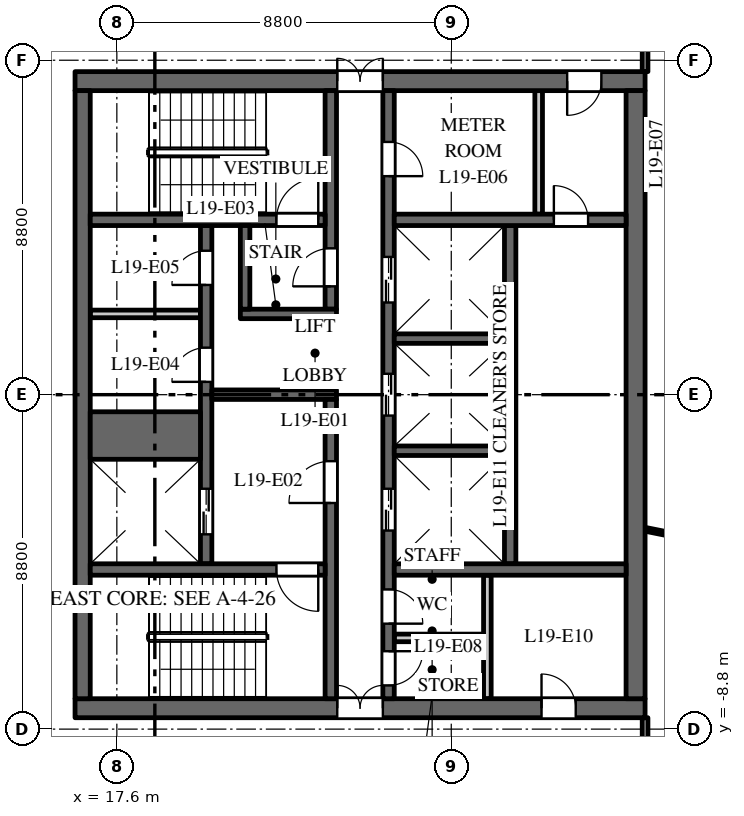
"""IFC4 building model, lengths in metres.
Left out: names, types, materials, properties, quantities, classifications, styles, units other than length and angle.
Written with IfcOpenShell. Run it as: python <this file> out.ifc"""

import sys

from ifc_helpers import new_model, si_unit, direction, frame, frame_2d, origin, place, context, subcontext, project, spatial, rectangle, extrude, element, fill, save


model = new_model("IFC4")
c1 = context("Model", 3, precision=1e-05, world=origin(), true_north=direction((0.0, 1.0)))
c2 = subcontext(c1, "Body", "Model", "MODEL_VIEW")
j1 = project(units=[si_unit("LENGTHUNIT", "METRE"), si_unit("PLANEANGLEUNIT", "RADIAN")], contexts=[c1])
p1 = place(None, origin())
s1 = spatial("IfcSite", under=j1, at=p1, CompositionType="ELEMENT")
p2 = place(p1, origin())
s2 = spatial("IfcBuilding", under=s1, at=p2, CompositionType="ELEMENT")
p3 = place(p2, frame((0.0, 0.0, 88.0)))
s3 = spatial("IfcBuildingStorey", under=s2, at=p3, CompositionType="ELEMENT", Elevation=88.0)
p4 = place(p3, frame((16.5, 8.25, 0.0), z_axis=(0.0, 0.0, 1.0), x_axis=(1.0, 0.0, 0.0)))
e1 = element("IfcWall", 1, at=p4, inside=s3, PredefinedType="SHEAR", context=c2, shape_type="SweptSolid", body=[
    extrude(rectangle(XDim=15.0, YDim=0.5, at=frame_2d((7.5, 0.0))), origin(), (0.0, 0.0, 1.0), 3.7),
])
p5 = place(p4, frame((6.9, 0.0, 0.0)))
e2 = element("IfcOpeningElement", 2, at=p5, cuts=e1, PredefinedType="OPENING", context=c2, shape_type="SweptSolid", body=[
    extrude(rectangle(XDim=1.2, YDim=2.1, at=frame_2d((0.6, 1.05))), frame((0.0, 0.26, 0.0), z_axis=(0.0, -1.0, 0.0), x_axis=(1.0, 0.0, 0.0)), (0.0, 0.0, 1.0), 0.52),
])
p6 = place(p4, frame((12.95, 0.0, 0.0)))
e3 = element("IfcOpeningElement", 3, at=p6, cuts=e1, PredefinedType="OPENING", context=c2, shape_type="SweptSolid", body=[
    extrude(rectangle(XDim=0.9, YDim=2.1, at=frame_2d((0.45, 1.05))), frame((0.0, 0.26, 0.0), z_axis=(0.0, -1.0, 0.0), x_axis=(1.0, 0.0, 0.0)), (0.0, 0.0, 1.0), 0.52),
])
p7 = place(p3, frame((16.5, -8.25, 0.0), z_axis=(0.0, 0.0, 1.0), x_axis=(1.0, 0.0, 0.0)))
e4 = element("IfcWall", 4, at=p7, inside=s3, PredefinedType="SHEAR", context=c2, shape_type="SweptSolid", body=[
    extrude(rectangle(XDim=15.0, YDim=0.5, at=frame_2d((7.5, 0.0))), origin(), (0.0, 0.0, 1.0), 3.7),
])
p8 = place(p7, frame((6.9, 0.0, 0.0)))
e5 = element("IfcOpeningElement", 5, at=p8, cuts=e4, PredefinedType="OPENING", context=c2, shape_type="SweptSolid", body=[
    extrude(rectangle(XDim=1.2, YDim=2.1, at=frame_2d((0.6, 1.05))), frame((0.0, 0.26, 0.0), z_axis=(0.0, -1.0, 0.0), x_axis=(1.0, 0.0, 0.0)), (0.0, 0.0, 1.0), 0.52),
])
p9 = place(p7, frame((12.275, 0.0, 0.0)))
e6 = element("IfcOpeningElement", 6, at=p9, cuts=e4, PredefinedType="OPENING", context=c2, shape_type="SweptSolid", body=[
    extrude(rectangle(XDim=0.9, YDim=2.1, at=frame_2d((0.45, 1.05))), frame((0.0, 0.26, 0.0), z_axis=(0.0, -1.0, 0.0), x_axis=(1.0, 0.0, 0.0)), (0.0, 0.0, 1.0), 0.52),
])
p10 = place(p3, frame((16.9, 2.125, 0.0), z_axis=(0.0, 0.0, 1.0), x_axis=(1.0, 0.0, 0.0)))
e7 = element("IfcWall", 7, at=p10, inside=s3, PredefinedType="PARTITIONING", context=c2, shape_type="SweptSolid", body=[
    extrude(rectangle(XDim=2.9, YDim=0.2, at=frame_2d((1.45, 0.0))), origin(), (0.0, 0.0, 1.0), 3.7),
])
p11 = place(p3, frame((27.95, -4.45, 0.0), z_axis=(0.0, 0.0, 1.0), x_axis=(0.0, 1.0, 0.0)))
e8 = element("IfcWall", 8, at=p11, inside=s3, PredefinedType="SHEAR", context=c2, shape_type="SweptSolid", body=[
    extrude(rectangle(XDim=8.9, YDim=0.3, at=frame_2d((4.45, 0.0))), origin(), (0.0, 0.0, 1.0), 3.7),
])
p12 = place(p3, frame((19.95, -4.45, 0.0), z_axis=(0.0, 0.0, 1.0), x_axis=(0.0, 1.0, 0.0)))
e9 = element("IfcWall", 9, at=p12, inside=s3, PredefinedType="SHEAR", context=c2, shape_type="SweptSolid", body=[
    extrude(rectangle(XDim=8.9, YDim=0.3, at=frame_2d((4.45, 0.0))), origin(), (0.0, 0.0, 1.0), 3.7),
])
p13 = place(p12, frame((0.775, 0.0, 0.0)))
e10 = element("IfcOpeningElement", 10, at=p13, cuts=e9, PredefinedType="OPENING", context=c2, shape_type="SweptSolid", body=[
    extrude(rectangle(XDim=1.2, YDim=2.1, at=frame_2d((0.6, 1.05))), frame((0.0, 0.16, 0.0), z_axis=(0.0, -1.0, 0.0), x_axis=(1.0, 0.0, 0.0)), (0.0, 0.0, 1.0), 0.32),
])
p14 = place(p12, frame((4.788, 0.0, 0.0)))
e11 = element("IfcOpeningElement", 11, at=p14, cuts=e9, PredefinedType="OPENING", context=c2, shape_type="SweptSolid", body=[
    extrude(rectangle(XDim=0.9, YDim=2.1, at=frame_2d((0.45, 1.05))), frame((0.0, 0.16, 0.0), z_axis=(0.0, -1.0, 0.0), x_axis=(1.0, 0.0, 0.0)), (0.0, 0.0, 1.0), 0.32),
])
p15 = place(p12, frame((7.337, 0.0, 0.0)))
e12 = element("IfcOpeningElement", 12, at=p15, cuts=e9, PredefinedType="OPENING", context=c2, shape_type="SweptSolid", body=[
    extrude(rectangle(XDim=0.9, YDim=2.1, at=frame_2d((0.45, 1.05))), frame((0.0, 0.16, 0.0), z_axis=(0.0, -1.0, 0.0), x_axis=(1.0, 0.0, 0.0)), (0.0, 0.0, 1.0), 0.32),
])
p16 = place(p3, frame((24.75, -8.0, 0.0), z_axis=(0.0, 0.0, 1.0), x_axis=(0.0, 1.0, 0.0)))
e13 = element("IfcWall", 13, at=p16, inside=s3, PredefinedType="SHEAR", context=c2, shape_type="SweptSolid", body=[
    extrude(rectangle(XDim=16.0, YDim=0.3, at=frame_2d((8.0, 0.0))), origin(), (0.0, 0.0, 1.0), 3.7),
])
p17 = place(p16, frame((4.425, 0.0, 0.0)))
e14 = element("IfcOpeningElement", 14, at=p17, cuts=e13, PredefinedType="OPENING", context=c2, shape_type="SweptSolid", body=[
    extrude(rectangle(XDim=1.1, YDim=2.1, at=frame_2d((0.55, 1.05))), frame((0.0, 0.16, 0.0), z_axis=(0.0, -1.0, 0.0), x_axis=(1.0, 0.0, 0.0)), (0.0, 0.0, 1.0), 0.32),
])
p18 = place(p16, frame((7.45, 0.0, 0.0)))
e15 = element("IfcOpeningElement", 15, at=p18, cuts=e13, PredefinedType="OPENING", context=c2, shape_type="SweptSolid", body=[
    extrude(rectangle(XDim=1.1, YDim=2.1, at=frame_2d((0.55, 1.05))), frame((0.0, 0.16, 0.0), z_axis=(0.0, -1.0, 0.0), x_axis=(1.0, 0.0, 0.0)), (0.0, 0.0, 1.0), 0.32),
])
p19 = place(p16, frame((10.425, 0.0, 0.0)))
e16 = element("IfcOpeningElement", 16, at=p19, cuts=e13, PredefinedType="OPENING", context=c2, shape_type="SweptSolid", body=[
    extrude(rectangle(XDim=1.2, YDim=2.1, at=frame_2d((0.6, 1.05))), frame((0.0, 0.16, 0.0), z_axis=(0.0, -1.0, 0.0), x_axis=(1.0, 0.0, 0.0)), (0.0, 0.0, 1.0), 0.32),
])
p20 = place(p16, frame((13.75, 0.0, 0.0)))
e17 = element("IfcOpeningElement", 17, at=p20, cuts=e13, PredefinedType="OPENING", context=c2, shape_type="SweptSolid", body=[
    extrude(rectangle(XDim=0.9, YDim=2.1, at=frame_2d((0.45, 1.05))), frame((0.0, 0.16, 0.0), z_axis=(0.0, -1.0, 0.0), x_axis=(1.0, 0.0, 0.0)), (0.0, 0.0, 1.0), 0.32),
])
p21 = place(p16, frame((1.975, 0.0, 0.0)))
e18 = element("IfcOpeningElement", 18, at=p21, cuts=e13, PredefinedType="OPENING", context=c2, shape_type="SweptSolid", body=[
    extrude(rectangle(XDim=0.9, YDim=2.1, at=frame_2d((0.45, 1.05))), frame((0.0, 0.16, 0.0), z_axis=(0.0, -1.0, 0.0), x_axis=(1.0, 0.0, 0.0)), (0.0, 0.0, 1.0), 0.32),
])
p22 = place(p16, frame((0.35, 0.0, 0.0)))
e19 = element("IfcOpeningElement", 19, at=p22, cuts=e13, PredefinedType="OPENING", context=c2, shape_type="SweptSolid", body=[
    extrude(rectangle(XDim=0.9, YDim=2.1, at=frame_2d((0.45, 1.05))), frame((0.0, 0.16, 0.0), z_axis=(0.0, -1.0, 0.0), x_axis=(1.0, 0.0, 0.0)), (0.0, 0.0, 1.0), 0.32),
])
p23 = place(p3, frame((20.1, 0.0, 0.0), z_axis=(0.0, 0.0, 1.0), x_axis=(1.0, 0.0, 0.0)))
e20 = element("IfcWall", 20, at=p23, inside=s3, PredefinedType="SHEAR", context=c2, shape_type="SweptSolid", body=[
    extrude(rectangle(XDim=3.28, YDim=0.25, at=frame_2d((1.64, 0.0))), origin(), (0.0, 0.0, 1.0), 3.7),
])
p24 = place(p3, frame((16.7, -8.0, 0.0), z_axis=(0.0, 0.0, 1.0), x_axis=(0.0, 1.0, 0.0)))
e21 = element("IfcWall", 21, at=p24, inside=s3, PredefinedType="SHEAR", context=c2, shape_type="SweptSolid", body=[
    extrude(rectangle(XDim=16.0, YDim=0.4, at=frame_2d((8.0, 0.0))), origin(), (0.0, 0.0, 1.0), 3.7),
])
p25 = place(p3, frame((31.25, -8.0, 0.0), z_axis=(0.0, 0.0, 1.0), x_axis=(0.0, 1.0, 0.0)))
e22 = element("IfcWall", 22, at=p25, inside=s3, PredefinedType="SHEAR", context=c2, shape_type="SweptSolid", body=[
    extrude(rectangle(XDim=16.0, YDim=0.5, at=frame_2d((8.0, 0.0))), origin(), (0.0, 0.0, 1.0), 3.7),
])
p26 = place(p3, frame((24.9, 4.6, 0.0), z_axis=(0.0, 0.0, 1.0), x_axis=(1.0, 0.0, 0.0)))
e23 = element("IfcWall", 23, at=p26, inside=s3, PredefinedType="SHEAR", context=c2, shape_type="SweptSolid", body=[
    extrude(rectangle(XDim=6.1, YDim=0.3, at=frame_2d((3.05, 0.0))), origin(), (0.0, 0.0, 1.0), 3.7),
])
p27 = place(p26, frame((4.2, 0.0, 0.0)))
e24 = element("IfcOpeningElement", 24, at=p27, cuts=e23, PredefinedType="OPENING", context=c2, shape_type="SweptSolid", body=[
    extrude(rectangle(XDim=0.9, YDim=2.1, at=frame_2d((0.45, 1.05))), frame((0.0, 0.16, 0.0), z_axis=(0.0, -1.0, 0.0), x_axis=(1.0, 0.0, 0.0)), (0.0, 0.0, 1.0), 0.32),
])
for number, where, z_axis, x_axis in (
    (25, (28.7, 4.75, 0.0), (0.0, 0.0, 1.0), (0.0, 1.0, 0.0)),
    (26, (27.35, -8.0, 0.0), (0.0, 0.0, 1.0), (0.0, 1.0, 0.0)),
):
    element("IfcWall", number, at=place(p3, frame(where, z_axis=z_axis, x_axis=x_axis)), inside=s3, PredefinedType="PARTITIONING", context=c2, shape_type="SweptSolid", body=[
        extrude(rectangle(XDim=3.25, YDim=0.2, at=frame_2d((1.625, 0.0))), origin(), (0.0, 0.0, 1.0), 3.7),
    ])
p28 = place(p3, frame((24.9, -6.4, 0.0), z_axis=(0.0, 0.0, 1.0), x_axis=(1.0, 0.0, 0.0)))
e27 = element("IfcWall", 27, at=p28, inside=s3, PredefinedType="PARTITIONING", context=c2, shape_type="SweptSolid", body=[
    extrude(rectangle(XDim=2.35, YDim=0.2, at=frame_2d((1.175, 0.0))), origin(), (0.0, 0.0, 1.0), 3.7),
])
p29 = place(p3, frame((24.9, -4.6, 0.0), z_axis=(0.0, 0.0, 1.0), x_axis=(1.0, 0.0, 0.0)))
e28 = element("IfcWall", 28, at=p29, inside=s3, PredefinedType="SHEAR", context=c2, shape_type="SweptSolid", body=[
    extrude(rectangle(XDim=6.1, YDim=0.3, at=frame_2d((3.05, 0.0))), origin(), (0.0, 0.0, 1.0), 3.7),
])
p30 = place(p3, frame((16.9, -1.075, 0.0), z_axis=(0.0, 0.0, 1.0), x_axis=(1.0, 0.0, 0.0)))
e29 = element("IfcWall", 29, at=p30, inside=s3, PredefinedType="SHEAR", context=c2, shape_type="SweptSolid", body=[
    extrude(rectangle(XDim=2.9, YDim=1.25, at=frame_2d((1.45, 0.0))), origin(), (0.0, 0.0, 1.0), 3.7),
])
for number, where, z_axis, x_axis in (
    (30, (24.9, -1.475, 0.0), (0.0, 0.0, 1.0), (1.0, 0.0, 0.0)),
    (31, (24.9, 1.475, 0.0), (0.0, 0.0, 1.0), (1.0, 0.0, 0.0)),
):
    element("IfcWall", number, at=place(p3, frame(where, z_axis=z_axis, x_axis=x_axis)), inside=s3, PredefinedType="SHEAR", context=c2, shape_type="SweptSolid", body=[
        extrude(rectangle(XDim=2.9, YDim=0.25, at=frame_2d((1.45, 0.0))), origin(), (0.0, 0.0, 1.0), 3.7),
    ])
p31 = place(p3, frame((23.23, 2.25, 0.0), z_axis=(0.0, 0.0, 1.0), x_axis=(0.0, 1.0, 0.0)))
e32 = element("IfcWall", 32, at=p31, inside=s3, PredefinedType="SHEAR", context=c2, shape_type="SweptSolid", body=[
    extrude(rectangle(XDim=5.75, YDim=0.3, at=frame_2d((2.875, 0.0))), origin(), (0.0, 0.0, 1.0), 3.7),
])
p32 = place(p31, frame((0.6, 0.0, 0.0)))
e33 = element("IfcOpeningElement", 33, at=p32, cuts=e32, PredefinedType="OPENING", context=c2, shape_type="SweptSolid", body=[
    extrude(rectangle(XDim=1.0, YDim=2.1, at=frame_2d((0.5, 1.05))), frame((0.0, 0.16, 0.0), z_axis=(0.0, -1.0, 0.0), x_axis=(1.0, 0.0, 0.0)), (0.0, 0.0, 1.0), 0.32),
])
p33 = place(p3, frame((23.23, -8.0, 0.0), z_axis=(0.0, 0.0, 1.0), x_axis=(0.0, 1.0, 0.0)))
e34 = element("IfcWall", 34, at=p33, inside=s3, PredefinedType="SHEAR", context=c2, shape_type="SweptSolid", body=[
    extrude(rectangle(XDim=7.875, YDim=0.3, at=frame_2d((3.938, 0.0))), origin(), (0.0, 0.0, 1.0), 3.7),
])
p34 = place(p33, frame((5.15, 0.0, 0.0)))
e35 = element("IfcOpeningElement", 35, at=p34, cuts=e34, PredefinedType="OPENING", context=c2, shape_type="SweptSolid", body=[
    extrude(rectangle(XDim=1.1, YDim=2.1, at=frame_2d((0.55, 1.05))), frame((0.0, 0.16, 0.0), z_axis=(0.0, -1.0, 0.0), x_axis=(1.0, 0.0, 0.0)), (0.0, 0.0, 1.0), 0.32),
])
p35 = place(p3, frame((16.9, 4.6, 0.0), z_axis=(0.0, 0.0, 1.0), x_axis=(1.0, 0.0, 0.0)))
e36 = element("IfcWall", 36, at=p35, inside=s3, PredefinedType="SHEAR", context=c2, shape_type="SweptSolid", body=[
    extrude(rectangle(XDim=6.18, YDim=0.3, at=frame_2d((3.09, 0.0))), origin(), (0.0, 0.0, 1.0), 3.7),
])
p36 = place(p35, frame((4.9, 0.0, 0.0)))
e37 = element("IfcOpeningElement", 37, at=p36, cuts=e36, PredefinedType="OPENING", context=c2, shape_type="SweptSolid", body=[
    extrude(rectangle(XDim=1.1, YDim=2.1, at=frame_2d((0.55, 1.05))), frame((0.0, 0.16, 0.0), z_axis=(0.0, -1.0, 0.0), x_axis=(1.0, 0.0, 0.0)), (0.0, 0.0, 1.0), 0.32),
])
p37 = place(p3, frame((16.9, -4.6, 0.0), z_axis=(0.0, 0.0, 1.0), x_axis=(1.0, 0.0, 0.0)))
e38 = element("IfcWall", 38, at=p37, inside=s3, PredefinedType="SHEAR", context=c2, shape_type="SweptSolid", body=[
    extrude(rectangle(XDim=6.18, YDim=0.3, at=frame_2d((3.09, 0.0))), origin(), (0.0, 0.0, 1.0), 3.7),
])
p38 = place(p37, frame((4.9, 0.0, 0.0)))
e39 = element("IfcOpeningElement", 39, at=p38, cuts=e38, PredefinedType="OPENING", context=c2, shape_type="SweptSolid", body=[
    extrude(rectangle(XDim=1.1, YDim=2.1, at=frame_2d((0.55, 1.05))), frame((0.0, 0.16, 0.0), z_axis=(0.0, -1.0, 0.0), x_axis=(1.0, 0.0, 0.0)), (0.0, 0.0, 1.0), 0.32),
])
p39 = place(p3, frame((20.85, 2.125, 0.0), z_axis=(0.0, 0.0, 1.0), x_axis=(1.0, 0.0, 0.0)))
e40 = element("IfcWall", 40, at=p39, inside=s3, PredefinedType="SHEAR", context=c2, shape_type="SweptSolid", body=[
    extrude(rectangle(XDim=2.53, YDim=0.25, at=frame_2d((1.265, 0.0))), origin(), (0.0, 0.0, 1.0), 3.7),
])
p40 = place(p3, frame((20.975, 2.25, 0.0), z_axis=(0.0, 0.0, 1.0), x_axis=(0.0, 1.0, 0.0)))
e41 = element("IfcWall", 41, at=p40, inside=s3, PredefinedType="SHEAR", context=c2, shape_type="SweptSolid", body=[
    extrude(rectangle(XDim=2.2, YDim=0.25, at=frame_2d((1.1, 0.0))), origin(), (0.0, 0.0, 1.0), 3.7),
])
p41 = place(p3, frame((31.5, -10.7, 0.0), z_axis=(0.0, 0.0, 1.0), x_axis=(0.0, 1.0, 0.0)))
e42 = element("IfcWall", 42, at=p41, inside=s3, PredefinedType="PARTITIONING", context=c2, shape_type="SweptSolid", body=[
    extrude(rectangle(XDim=2.2, YDim=0.15, at=frame_2d((1.1, 0.0))), origin(), (0.0, 0.0, 1.0), 2.9),
])
p42 = place(p41, frame((0.65, 0.0, 0.0)))
e43 = element("IfcOpeningElement", 43, at=p42, cuts=e42, PredefinedType="OPENING", context=c2, shape_type="SweptSolid", body=[
    extrude(rectangle(XDim=1.0, YDim=2.1, at=frame_2d((0.5, 1.05))), frame((0.0, 0.085, 0.0), z_axis=(0.0, -1.0, 0.0), x_axis=(1.0, 0.0, 0.0)), (0.0, 0.0, 1.0), 0.17),
])
p43 = place(p3, frame((31.5, -3.542, 0.0), z_axis=(0.0, 0.0, 1.0), x_axis=(0.980357474535, -0.197228857227, 0.0)))
e44 = element("IfcWall", 44, at=p43, inside=s3, PredefinedType="PARTITIONING", context=c2, shape_type="SweptSolid", body=[
    extrude(rectangle(XDim=4.092, YDim=0.1, at=frame_2d((2.046, 0.0))), origin(), (0.0, 0.0, 1.0), 2.9),
])
p44 = place(p3, frame((31.5, 8.5, 0.0), z_axis=(0.0, 0.0, 1.0), x_axis=(0.0, 1.0, 0.0)))
e45 = element("IfcWall", 45, at=p44, inside=s3, PredefinedType="PARTITIONING", context=c2, shape_type="SweptSolid", body=[
    extrude(rectangle(XDim=2.2, YDim=0.15, at=frame_2d((1.1, 0.0))), origin(), (0.0, 0.0, 1.0), 2.9),
])
p45 = place(p44, frame((0.65, 0.0, 0.0)))
e46 = element("IfcOpeningElement", 46, at=p45, cuts=e45, PredefinedType="OPENING", context=c2, shape_type="SweptSolid", body=[
    extrude(rectangle(XDim=1.0, YDim=2.1, at=frame_2d((0.5, 1.05))), frame((0.0, 0.085, 0.0), z_axis=(0.0, -1.0, 0.0), x_axis=(1.0, 0.0, 0.0)), (0.0, 0.0, 1.0), 0.17),
])
p46 = place(p13, origin())
e47 = element("IfcDoor", 47, at=p46, inside=s3, OperationType="DOUBLE_DOOR_SLIDING", PredefinedType="DOOR", context=c2, shape_type="SweptSolid", body=[
    extrude(rectangle(XDim=1.2, YDim=2.1, at=frame_2d((0.6, 1.05))), frame((0.0, 0.025, 0.0), z_axis=(0.0, -1.0, 0.0), x_axis=(1.0, 0.0, 0.0)), (0.0, 0.0, 1.0), 0.05),
])
fill(e10, e47)
p47 = place(p17, origin())
e48 = element("IfcDoor", 48, at=p47, inside=s3, OperationType="DOUBLE_DOOR_SLIDING", PredefinedType="DOOR", context=c2, shape_type="SweptSolid", body=[
    extrude(rectangle(XDim=1.1, YDim=2.1, at=frame_2d((0.55, 1.05))), frame((0.0, 0.025, 0.0), z_axis=(0.0, -1.0, 0.0), x_axis=(1.0, 0.0, 0.0)), (0.0, 0.0, 1.0), 0.05),
])
fill(e14, e48)
p48 = place(p18, origin())
e49 = element("IfcDoor", 49, at=p48, inside=s3, OperationType="DOUBLE_DOOR_SLIDING", PredefinedType="DOOR", context=c2, shape_type="SweptSolid", body=[
    extrude(rectangle(XDim=1.1, YDim=2.1, at=frame_2d((0.55, 1.05))), frame((0.0, 0.025, 0.0), z_axis=(0.0, -1.0, 0.0), x_axis=(1.0, 0.0, 0.0)), (0.0, 0.0, 1.0), 0.05),
])
fill(e15, e49)
p49 = place(p19, origin())
e50 = element("IfcDoor", 50, at=p49, inside=s3, OperationType="DOUBLE_DOOR_SLIDING", PredefinedType="DOOR", context=c2, shape_type="SweptSolid", body=[
    extrude(rectangle(XDim=1.2, YDim=2.1, at=frame_2d((0.6, 1.05))), frame((0.0, 0.025, 0.0), z_axis=(0.0, -1.0, 0.0), x_axis=(1.0, 0.0, 0.0)), (0.0, 0.0, 1.0), 0.05),
])
fill(e16, e50)
p50 = place(p36, origin())
e51 = element("IfcDoor", 51, at=p50, inside=s3, OperationType="SINGLE_SWING_LEFT", PredefinedType="DOOR", context=c2, shape_type="SweptSolid", body=[
    extrude(rectangle(XDim=1.1, YDim=2.1, at=frame_2d((0.55, 1.05))), frame((0.0, 0.025, 0.0), z_axis=(0.0, -1.0, 0.0), x_axis=(1.0, 0.0, 0.0)), (0.0, 0.0, 1.0), 0.05),
])
fill(e37, e51)
p51 = place(p38, origin())
e52 = element("IfcDoor", 52, at=p51, inside=s3, OperationType="SINGLE_SWING_RIGHT", PredefinedType="DOOR", context=c2, shape_type="SweptSolid", body=[
    extrude(rectangle(XDim=1.1, YDim=2.1, at=frame_2d((0.55, 1.05))), frame((0.0, 0.025, 0.0), z_axis=(0.0, -1.0, 0.0), x_axis=(1.0, 0.0, 0.0)), (0.0, 0.0, 1.0), 0.05),
])
fill(e39, e52)
p52 = place(p34, origin())
e53 = element("IfcDoor", 53, at=p52, inside=s3, OperationType="SINGLE_SWING_RIGHT", PredefinedType="DOOR", context=c2, shape_type="SweptSolid", body=[
    extrude(rectangle(XDim=1.1, YDim=2.1, at=frame_2d((0.55, 1.05))), frame((0.0, 0.025, 0.0), z_axis=(0.0, -1.0, 0.0), x_axis=(1.0, 0.0, 0.0)), (0.0, 0.0, 1.0), 0.05),
])
fill(e35, e53)
p53 = place(p32, origin())
e54 = element("IfcDoor", 54, at=p53, inside=s3, OperationType="SINGLE_SWING_RIGHT", PredefinedType="DOOR", context=c2, shape_type="SweptSolid", body=[
    extrude(rectangle(XDim=1.0, YDim=2.1, at=frame_2d((0.5, 1.05))), frame((0.0, 0.025, 0.0), z_axis=(0.0, -1.0, 0.0), x_axis=(1.0, 0.0, 0.0)), (0.0, 0.0, 1.0), 0.05),
])
fill(e33, e54)
p54 = place(p5, origin())
e55 = element("IfcDoor", 55, at=p54, inside=s3, OperationType="DOUBLE_DOOR_DOUBLE_SWING", PredefinedType="DOOR", context=c2, shape_type="SweptSolid", body=[
    extrude(rectangle(XDim=1.2, YDim=2.1, at=frame_2d((0.6, 1.05))), frame((0.0, 0.025, 0.0), z_axis=(0.0, -1.0, 0.0), x_axis=(1.0, 0.0, 0.0)), (0.0, 0.0, 1.0), 0.05),
])
fill(e2, e55)
p55 = place(p8, origin())
e56 = element("IfcDoor", 56, at=p55, inside=s3, OperationType="DOUBLE_DOOR_DOUBLE_SWING", PredefinedType="DOOR", context=c2, shape_type="SweptSolid", body=[
    extrude(rectangle(XDim=1.2, YDim=2.1, at=frame_2d((0.6, 1.05))), frame((0.0, 0.025, 0.0), z_axis=(0.0, -1.0, 0.0), x_axis=(1.0, 0.0, 0.0)), (0.0, 0.0, 1.0), 0.05),
])
fill(e5, e56)
p56 = place(p14, origin())
e57 = element("IfcDoor", 57, at=p56, inside=s3, OperationType="SINGLE_SWING_RIGHT", PredefinedType="DOOR", context=c2, shape_type="SweptSolid", body=[
    extrude(rectangle(XDim=0.9, YDim=2.1, at=frame_2d((0.45, 1.05))), frame((0.0, 0.025, 0.0), z_axis=(0.0, -1.0, 0.0), x_axis=(1.0, 0.0, 0.0)), (0.0, 0.0, 1.0), 0.05),
])
fill(e11, e57)
p57 = place(p15, origin())
e58 = element("IfcDoor", 58, at=p57, inside=s3, OperationType="SINGLE_SWING_RIGHT", PredefinedType="DOOR", context=c2, shape_type="SweptSolid", body=[
    extrude(rectangle(XDim=0.9, YDim=2.1, at=frame_2d((0.45, 1.05))), frame((0.0, 0.025, 0.0), z_axis=(0.0, -1.0, 0.0), x_axis=(1.0, 0.0, 0.0)), (0.0, 0.0, 1.0), 0.05),
])
fill(e12, e58)
p58 = place(p20, origin())
e59 = element("IfcDoor", 59, at=p58, inside=s3, OperationType="SINGLE_SWING_LEFT", PredefinedType="DOOR", context=c2, shape_type="SweptSolid", body=[
    extrude(rectangle(XDim=0.9, YDim=2.1, at=frame_2d((0.45, 1.05))), frame((0.0, 0.025, 0.0), z_axis=(0.0, -1.0, 0.0), x_axis=(1.0, 0.0, 0.0)), (0.0, 0.0, 1.0), 0.05),
])
fill(e17, e59)
p59 = place(p6, origin())
e60 = element("IfcDoor", 60, at=p59, inside=s3, OperationType="SINGLE_SWING_LEFT", PredefinedType="DOOR", context=c2, shape_type="SweptSolid", body=[
    extrude(rectangle(XDim=0.9, YDim=2.1, at=frame_2d((0.45, 1.05))), frame((0.0, 0.025, 0.0), z_axis=(0.0, -1.0, 0.0), x_axis=(1.0, 0.0, 0.0)), (0.0, 0.0, 1.0), 0.05),
])
fill(e3, e60)
p60 = place(p21, origin())
e61 = element("IfcDoor", 61, at=p60, inside=s3, OperationType="SINGLE_SWING_LEFT", PredefinedType="DOOR", context=c2, shape_type="SweptSolid", body=[
    extrude(rectangle(XDim=0.9, YDim=2.1, at=frame_2d((0.45, 1.05))), frame((0.0, 0.025, 0.0), z_axis=(0.0, -1.0, 0.0), x_axis=(1.0, 0.0, 0.0)), (0.0, 0.0, 1.0), 0.05),
])
fill(e18, e61)
p61 = place(p22, origin())
e62 = element("IfcDoor", 62, at=p61, inside=s3, OperationType="SINGLE_SWING_RIGHT", PredefinedType="DOOR", context=c2, shape_type="SweptSolid", body=[
    extrude(rectangle(XDim=0.9, YDim=2.1, at=frame_2d((0.45, 1.05))), frame((0.0, 0.025, 0.0), z_axis=(0.0, -1.0, 0.0), x_axis=(1.0, 0.0, 0.0)), (0.0, 0.0, 1.0), 0.05),
])
fill(e19, e62)
p62 = place(p9, origin())
e63 = element("IfcDoor", 63, at=p62, inside=s3, OperationType="SINGLE_SWING_RIGHT", PredefinedType="DOOR", context=c2, shape_type="SweptSolid", body=[
    extrude(rectangle(XDim=0.9, YDim=2.1, at=frame_2d((0.45, 1.05))), frame((0.0, 0.025, 0.0), z_axis=(0.0, -1.0, 0.0), x_axis=(1.0, 0.0, 0.0)), (0.0, 0.0, 1.0), 0.05),
])
fill(e6, e63)
p63 = place(p27, origin())
e64 = element("IfcDoor", 64, at=p63, inside=s3, OperationType="SINGLE_SWING_RIGHT", PredefinedType="DOOR", context=c2, shape_type="SweptSolid", body=[
    extrude(rectangle(XDim=0.9, YDim=2.1, at=frame_2d((0.45, 1.05))), frame((0.0, 0.025, 0.0), z_axis=(0.0, -1.0, 0.0), x_axis=(1.0, 0.0, 0.0)), (0.0, 0.0, 1.0), 0.05),
])
fill(e24, e64)
save(model, sys.argv[1])
